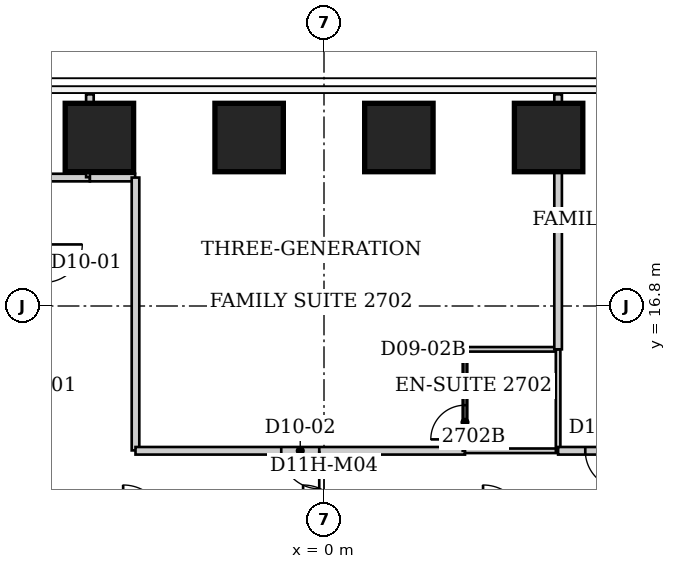
"""IFC4 building model, lengths in metres.
Left out: names, types, materials, properties, quantities, classifications, styles, units other than length and angle.
Written with IfcOpenShell. Run it as: python <this file> out.ifc"""

import sys

from ifc_helpers import new_model, si_unit, direction, frame, frame_2d, origin, origin_2d, place, context, subcontext, project, spatial, rectangle, extrude, element, fill, save


model = new_model("IFC4")
c1 = context("Model", 3, precision=1e-05, world=origin(), true_north=direction((0.0, 1.0)))
c2 = subcontext(c1, "Body", "Model", "MODEL_VIEW")
j1 = project(units=[si_unit("LENGTHUNIT", "METRE"), si_unit("PLANEANGLEUNIT", "RADIAN")], contexts=[c1])
p1 = place(None, origin())
s1 = spatial("IfcSite", under=j1, at=p1, CompositionType="ELEMENT")
p2 = place(p1, origin())
s2 = spatial("IfcBuilding", under=s1, at=p2, CompositionType="ELEMENT")
p3 = place(p2, frame((0.0, 0.0, 112.0)))
s3 = spatial("IfcBuildingStorey", under=s2, at=p3, CompositionType="ELEMENT", Elevation=112.0)
for number, where, z_axis, x_axis in (
    (1, (-5.91, 21.234, 0.0), (0.0, 0.0, 1.0), (0.0, 1.0, 0.0)),
    (2, (-1.97, 21.234, 0.0), (0.0, 0.0, 1.0), (0.0, 1.0, 0.0)),
    (3, (1.97, 21.234, 0.0), (0.0, 0.0, 1.0), (0.0, 1.0, 0.0)),
    (4, (5.91, 21.234, 0.0), (0.0, 0.0, 1.0), (0.0, 1.0, 0.0)),
):
    element("IfcColumn", number, at=place(p3, frame(where, z_axis=z_axis, x_axis=x_axis)), inside=s3, PredefinedType="COLUMN", context=c2, shape_type="SweptSolid", body=[
        extrude(rectangle(XDim=1.8, YDim=1.8, at=origin_2d()), origin(), (0.0, 0.0, 1.0), 3.8),
    ])
p4 = place(p3, frame((-6.16, 20.18, 0.0), z_axis=(0.0, 0.0, 1.0), x_axis=(-1.0, 0.0, 0.0)))
e5 = element("IfcWall", 5, at=p4, inside=s3, PredefinedType="PARTITIONING", context=c2, shape_type="SweptSolid", body=[
    extrude(rectangle(XDim=1.19, YDim=0.2, at=frame_2d((0.595, 0.0))), origin(), (0.0, 0.0, 1.0), 3.64),
])
p5 = place(p3, frame((-6.16, 22.37, 0.0), z_axis=(0.0, 0.0, 1.0), x_axis=(0.0, -1.0, 0.0)))
e6 = element("IfcWall", 6, at=p5, inside=s3, PredefinedType="PARTITIONING", context=c2, shape_type="SweptSolid", body=[
    extrude(rectangle(XDim=2.18, YDim=0.2, at=frame_2d((1.09, 0.0))), origin(), (0.0, 0.0, 1.0), 3.64),
])
p6 = place(p3, frame((-4.97, 20.18, 0.0), z_axis=(0.0, 0.0, 1.0), x_axis=(-1.0, 0.0, 0.0)))
e7 = element("IfcWall", 7, at=p6, inside=s3, PredefinedType="PARTITIONING", context=c2, shape_type="SweptSolid", body=[
    extrude(rectangle(XDim=1.19, YDim=0.2, at=frame_2d((0.595, 0.0))), origin(), (0.0, 0.0, 1.0), 3.64),
])
p7 = place(p3, frame((-4.96, 13.0, 0.0), z_axis=(0.0, 0.0, 1.0), x_axis=(0.0, 1.0, 0.0)))
e8 = element("IfcWall", 8, at=p7, inside=s3, PredefinedType="PARTITIONING", context=c2, shape_type="SweptSolid", body=[
    extrude(rectangle(XDim=7.18, YDim=0.2, at=frame_2d((3.59, 0.0))), origin(), (0.0, 0.0, 1.0), 3.64),
])
p8 = place(p3, frame((3.71, 12.99, 0.0), z_axis=(0.0, 0.0, 1.0), x_axis=(-1.0, 0.0, 0.0)))
e9 = element("IfcWall", 9, at=p8, inside=s3, PredefinedType="PARTITIONING", context=c2, shape_type="SweptSolid", body=[
    extrude(rectangle(XDim=8.67, YDim=0.2, at=frame_2d((4.335, 0.0))), origin(), (0.0, 0.0, 1.0), 3.64),
])
p9 = place(p8, frame((3.835, 0.0, 0.0)))
e10 = element("IfcOpeningElement", 10, at=p9, cuts=e9, PredefinedType="OPENING", context=c2, shape_type="SweptSolid", body=[
    extrude(rectangle(XDim=1.0, YDim=2.13, at=frame_2d((0.5, 1.065))), frame((0.0, 0.1, 0.0), z_axis=(0.0, -1.0, 0.0), x_axis=(1.0, 0.0, 0.0)), (0.0, 0.0, 1.0), 0.2),
])
p10 = place(p3, frame((3.71, 15.66, 0.0), z_axis=(0.0, 0.0, 1.0), x_axis=(0.0, -1.0, 0.0)))
e11 = element("IfcWall", 11, at=p10, inside=s3, PredefinedType="PARTITIONING", context=c2, shape_type="SweptSolid", body=[
    extrude(rectangle(XDim=2.67, YDim=0.12, at=frame_2d((1.335, 0.0))), origin(), (0.0, 0.0, 1.0), 3.64),
])
p11 = place(p10, frame((1.47, 0.0, 0.0)))
e12 = element("IfcOpeningElement", 12, at=p11, cuts=e11, PredefinedType="OPENING", context=c2, shape_type="SweptSolid", body=[
    extrude(rectangle(XDim=0.9, YDim=2.03, at=frame_2d((0.45, 1.015))), frame((0.0, 0.06, 0.0), z_axis=(0.0, -1.0, 0.0), x_axis=(1.0, 0.0, 0.0)), (0.0, 0.0, 1.0), 0.12),
])
for number, where, z_axis, x_axis in (
    (13, (6.16, 12.99, 0.0), (0.0, 0.0, 1.0), (-1.0, 0.0, 0.0)),
    (14, (6.16, 15.66, 0.0), (0.0, 0.0, 1.0), (-1.0, 0.0, 0.0)),
):
    element("IfcWall", number, at=place(p3, frame(where, z_axis=z_axis, x_axis=x_axis)), inside=s3, PredefinedType="PARTITIONING", context=c2, shape_type="SweptSolid", body=[
        extrude(rectangle(XDim=2.45, YDim=0.12, at=frame_2d((1.225, 0.0))), origin(), (0.0, 0.0, 1.0), 3.64),
    ])
p12 = place(p3, frame((6.16, 15.66, 0.0), z_axis=(0.0, 0.0, 1.0), x_axis=(0.0, -1.0, 0.0)))
e15 = element("IfcWall", 15, at=p12, inside=s3, PredefinedType="PARTITIONING", context=c2, shape_type="SweptSolid", body=[
    extrude(rectangle(XDim=2.67, YDim=0.12, at=frame_2d((1.335, 0.0))), origin(), (0.0, 0.0, 1.0), 3.64),
])
p13 = place(p3, frame((6.16, 22.37, 0.0), z_axis=(0.0, 0.0, 1.0), x_axis=(0.0, -1.0, 0.0)))
e16 = element("IfcWall", 16, at=p13, inside=s3, PredefinedType="PARTITIONING", context=c2, shape_type="SweptSolid", body=[
    extrude(rectangle(XDim=6.71, YDim=0.2, at=frame_2d((3.355, 0.0))), origin(), (0.0, 0.0, 1.0), 3.64),
])
p14 = place(p3, frame((8.59, 12.99, 0.0), z_axis=(0.0, 0.0, 1.0), x_axis=(-1.0, 0.0, 0.0)))
e17 = element("IfcWall", 17, at=p14, inside=s3, PredefinedType="PARTITIONING", context=c2, shape_type="SweptSolid", body=[
    extrude(rectangle(XDim=2.43, YDim=0.2, at=frame_2d((1.215, 0.0))), origin(), (0.0, 0.0, 1.0), 3.64),
])
p15 = place(p14, frame((0.715, 0.0, 0.0)))
e18 = element("IfcOpeningElement", 18, at=p15, cuts=e17, PredefinedType="OPENING", context=c2, shape_type="SweptSolid", body=[
    extrude(rectangle(XDim=1.0, YDim=2.13, at=frame_2d((0.5, 1.065))), frame((0.0, 0.1, 0.0), z_axis=(0.0, -1.0, 0.0), x_axis=(1.0, 0.0, 0.0)), (0.0, 0.0, 1.0), 0.2),
])
p16 = place(p9, origin())
e19 = element("IfcDoor", 19, at=p16, inside=s3, OperationType="SINGLE_SWING_LEFT", PredefinedType="DOOR", context=c2, shape_type="SweptSolid", body=[
    extrude(rectangle(XDim=1.0, YDim=2.13, at=frame_2d((0.5, 1.065))), frame((0.0, 0.025, 0.0), z_axis=(0.0, -1.0, 0.0), x_axis=(1.0, 0.0, 0.0)), (0.0, 0.0, 1.0), 0.05),
])
fill(e10, e19)
p17 = place(p11, origin())
e20 = element("IfcDoor", 20, at=p17, inside=s3, OperationType="SINGLE_SWING_RIGHT", PredefinedType="DOOR", context=c2, shape_type="SweptSolid", body=[
    extrude(rectangle(XDim=0.9, YDim=2.03, at=frame_2d((0.45, 1.015))), frame((0.0, 0.025, 0.0), z_axis=(0.0, -1.0, 0.0), x_axis=(1.0, 0.0, 0.0)), (0.0, 0.0, 1.0), 0.05),
])
fill(e12, e20)
p18 = place(p15, origin())
e21 = element("IfcDoor", 21, at=p18, inside=s3, OperationType="SINGLE_SWING_LEFT", PredefinedType="DOOR", context=c2, shape_type="SweptSolid", body=[
    extrude(rectangle(XDim=1.0, YDim=2.13, at=frame_2d((0.5, 1.065))), frame((0.0, 0.025, 0.0), z_axis=(0.0, -1.0, 0.0), x_axis=(1.0, 0.0, 0.0)), (0.0, 0.0, 1.0), 0.05),
])
fill(e18, e21)
save(model, sys.argv[1])
